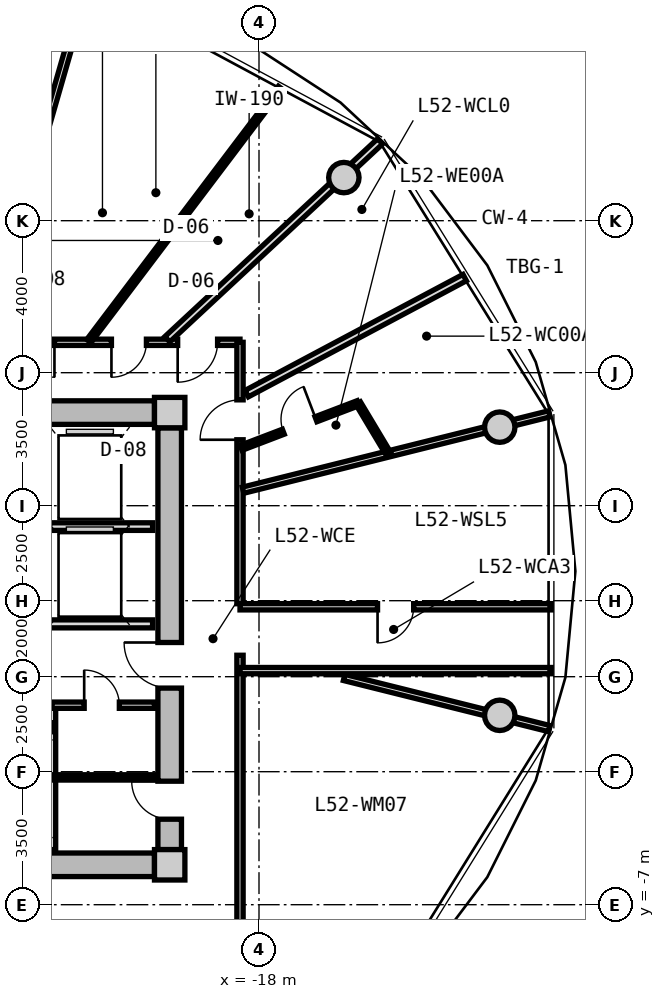
"""IFC4 building model, lengths in metres.
Left out: names, types, materials, properties, quantities, classifications, styles, units other than length and angle.
Written with IfcOpenShell. Run it as: python <this file> out.ifc"""

import sys

from ifc_helpers import new_model, si_unit, direction, frame, frame_2d, origin, origin_2d, place, context, subcontext, project, spatial, rectangle, circle, extrude, source, transform, mapped, element, fill, save


model = new_model("IFC4")
c1 = context("Model", 3, precision=1e-05, world=origin(), true_north=direction((0.0, 1.0)))
c2 = subcontext(c1, "Body", "Model", "MODEL_VIEW")
j1 = project(units=[si_unit("LENGTHUNIT", "METRE"), si_unit("PLANEANGLEUNIT", "RADIAN")], contexts=[c1])
p1 = place(None, origin())
s1 = spatial("IfcSite", under=j1, at=p1, CompositionType="ELEMENT")
p2 = place(p1, origin())
s2 = spatial("IfcBuilding", under=s1, at=p2, CompositionType="ELEMENT")
p3 = place(p2, frame((0.0, 0.0, 167.85)))
s3 = spatial("IfcBuildingStorey", under=s2, at=p3, CompositionType="ELEMENT", Elevation=167.85)
m1 = source(origin(), c2, "Body", "SweptSolid", [
    extrude(rectangle(XDim=0.8, YDim=0.8, at=origin_2d()), origin(), (0.0, 0.0, 1.0), 3.05),
])
for number, where, z_axis, x_axis in (
    (1, (-20.35, -5.95, 0.0), (0.0, 0.0, 1.0), (1.0, 0.0, 0.0)),
    (2, (-20.35, 5.95, 0.0), (0.0, 0.0, 1.0), (1.0, 0.0, 0.0)),
):
    element("IfcColumn", number, at=place(p3, frame(where, z_axis=z_axis, x_axis=x_axis)), inside=s3, PredefinedType="COLUMN", context=c2, shape_type="MappedRepresentation", body=[
        mapped(m1, transform((0.0, 0.0, 0.0), x_axis=(1.0, 0.0, 0.0), y_axis=(0.0, 1.0, 0.0), z_axis=(0.0, 0.0, 1.0), scale=1.0)),
    ])
m2 = source(origin(), c2, "Body", "SweptSolid", [
    extrude(rectangle(XDim=14.5, YDim=0.62, at=frame_2d((7.25, 0.0))), origin(), (0.0, 0.0, 1.0), 2.81),
])
for number, where, z_axis, x_axis in (
    (3, (-35.25, 5.95, 0.0), (0.0, 0.0, 1.0), (1.0, 0.0, 0.0)),
    (4, (-20.75, -5.95, 0.0), (0.0, 0.0, 1.0), (-1.0, 0.0, 0.0)),
):
    element("IfcWall", number, at=place(p3, frame(where, z_axis=z_axis, x_axis=x_axis)), inside=s3, PredefinedType="SHEAR", context=c2, shape_type="MappedRepresentation", body=[
        mapped(m2, transform((0.0, 0.0, 0.0), x_axis=(1.0, 0.0, 0.0), y_axis=(0.0, 1.0, 0.0), z_axis=(0.0, 0.0, 1.0), scale=1.0)),
    ])
m3 = source(origin(), c2, "Body", "SweptSolid", [
    extrude(rectangle(XDim=11.1, YDim=0.62, at=frame_2d((5.55, 0.0))), origin(), (0.0, 0.0, 1.0), 2.81),
])
p4 = place(p3, frame((-20.35, 5.55, 0.0), z_axis=(0.0, 0.0, 1.0), x_axis=(0.0, -1.0, 0.0)))
e5 = element("IfcWall", 5, at=p4, inside=s3, PredefinedType="SHEAR", context=c2, shape_type="MappedRepresentation", body=[
    mapped(m3, transform((0.0, 0.0, 0.0), x_axis=(1.0, 0.0, 0.0), y_axis=(0.0, 1.0, 0.0), z_axis=(0.0, 0.0, 1.0), scale=1.0)),
])
p5 = place(p4, frame((5.65, 0.0, 0.0)))
e6 = element("IfcOpeningElement", 6, at=p5, cuts=e5, PredefinedType="OPENING", context=c2, shape_type="SweptSolid", body=[
    extrude(rectangle(XDim=1.2, YDim=2.15, at=frame_2d((0.6, 1.075))), frame((0.0, 0.32, 0.0), z_axis=(0.0, -1.0, 0.0), x_axis=(1.0, 0.0, 0.0)), (0.0, 0.0, 1.0), 0.64),
])
p6 = place(p4, frame((9.3, 0.0, 0.0)))
e7 = element("IfcOpeningElement", 7, at=p6, cuts=e5, PredefinedType="OPENING", context=c2, shape_type="SweptSolid", body=[
    extrude(rectangle(XDim=1.0, YDim=2.1, at=frame_2d((0.5, 1.05))), frame((0.0, 0.32, 0.0), z_axis=(0.0, -1.0, 0.0), x_axis=(1.0, 0.0, 0.0)), (0.0, 0.0, 1.0), 0.64),
])
m4 = source(origin(), c2, "Body", "SweptSolid", [
    extrude(circle(Radius=0.4, at=origin_2d()), origin(), (0.0, 0.0, 1.0), 3.05),
])
for number, where, z_axis, x_axis in (
    (8, (-11.665, 5.567, 0.0), (0.0, 0.0, 1.0), (1.0, 0.0, 0.0)),
    (9, (-15.767, 12.135, 0.0), (0.0, 0.0, 1.0), (1.0, 0.0, 0.0)),
    (10, (-11.665, -2.016, 0.0), (0.0, 0.0, 1.0), (1.0, 0.0, 0.0)),
):
    element("IfcColumn", number, at=place(p3, frame(where, z_axis=z_axis, x_axis=x_axis)), inside=s3, PredefinedType="COLUMN", context=c2, shape_type="MappedRepresentation", body=[
        mapped(m4, transform((0.0, 0.0, 0.0), x_axis=(1.0, 0.0, 0.0), y_axis=(0.0, 1.0, 0.0), z_axis=(0.0, 0.0, 1.0), scale=1.0)),
    ])
m5 = source(origin(), c2, "Body", "SweptSolid", [
    extrude(rectangle(XDim=3.2, YDim=0.2, at=frame_2d((1.6, 0.0))), origin(), (0.0, 0.0, 1.0), 2.795),
])
p7 = place(p3, frame((-24.0, 2.95, 0.0), z_axis=(0.0, 0.0, 1.0), x_axis=(1.0, 0.0, 0.0)))
e11 = element("IfcWall", 11, at=p7, inside=s3, PredefinedType="PARTITIONING", context=c2, shape_type="MappedRepresentation", body=[
    mapped(m5, transform((0.0, 0.0, 0.0), x_axis=(1.0, 0.0, 0.0), y_axis=(0.0, 1.0, 0.0), z_axis=(0.0, 0.0, 1.0), scale=1.0)),
])
m6 = source(origin(), c2, "Body", "SweptSolid", [
    extrude(rectangle(XDim=6.66, YDim=0.21, at=frame_2d((3.33, 0.0))), origin(), (0.0, 0.0, 1.0), 2.795),
])
p8 = place(p3, frame((-27.46, 0.39, 0.0), z_axis=(0.0, 0.0, 1.0), x_axis=(1.0, 0.0, 0.0)))
e12 = element("IfcWall", 12, at=p8, inside=s3, PredefinedType="PARTITIONING", context=c2, shape_type="MappedRepresentation", body=[
    mapped(m6, transform((0.0, 0.0, 0.0), x_axis=(1.0, 0.0, 0.0), y_axis=(0.0, 1.0, 0.0), z_axis=(0.0, 0.0, 1.0), scale=1.0)),
])
p9 = place(p8, frame((1.0, 0.0, 0.0)))
e13 = element("IfcOpeningElement", 13, at=p9, cuts=e12, PredefinedType="OPENING", context=c2, shape_type="SweptSolid", body=[
    extrude(rectangle(XDim=1.2, YDim=2.15, at=frame_2d((0.6, 1.075))), frame((0.0, 0.115, 0.0), z_axis=(0.0, -1.0, 0.0), x_axis=(1.0, 0.0, 0.0)), (0.0, 0.0, 1.0), 0.23),
])
m7 = source(origin(), c2, "Body", "SweptSolid", [
    extrude(rectangle(XDim=3.8, YDim=0.2, at=frame_2d((1.9, 0.0))), origin(), (0.0, 0.0, 1.0), 2.795),
])
p10 = place(p3, frame((-23.45, -5.55, 0.0), z_axis=(0.0, 0.0, 1.0), x_axis=(0.0, 1.0, 0.0)))
e14 = element("IfcWall", 14, at=p10, inside=s3, PredefinedType="PARTITIONING", context=c2, shape_type="MappedRepresentation", body=[
    mapped(m7, transform((0.0, 0.0, 0.0), x_axis=(1.0, 0.0, 0.0), y_axis=(0.0, 1.0, 0.0), z_axis=(0.0, 0.0, 1.0), scale=1.0)),
])
m8 = source(origin(), c2, "Body", "SweptSolid", [
    extrude(rectangle(XDim=2.7, YDim=0.165, at=frame_2d((1.35, 0.0))), origin(), (0.0, 0.0, 1.0), 2.795),
])
p11 = place(p3, frame((-23.45, -1.75, 0.0), z_axis=(0.0, 0.0, 1.0), x_axis=(1.0, 0.0, 0.0)))
e15 = element("IfcWall", 15, at=p11, inside=s3, PredefinedType="PARTITIONING", context=c2, shape_type="MappedRepresentation", body=[
    mapped(m8, transform((0.0, 0.0, 0.0), x_axis=(1.0, 0.0, 0.0), y_axis=(0.0, 1.0, 0.0), z_axis=(0.0, 0.0, 1.0), scale=1.0)),
])
p12 = place(p11, frame((0.85, 0.0, 0.0)))
e16 = element("IfcOpeningElement", 16, at=p12, cuts=e15, PredefinedType="OPENING", context=c2, shape_type="SweptSolid", body=[
    extrude(rectangle(XDim=0.925, YDim=2.1, at=frame_2d((0.462, 1.05))), frame((0.0, 0.093, 0.0), z_axis=(0.0, -1.0, 0.0), x_axis=(1.0, 0.0, 0.0)), (0.0, 0.0, 1.0), 0.185),
])
m9 = source(origin(), c2, "Body", "SweptSolid", [
    extrude(rectangle(XDim=2.7, YDim=0.14, at=frame_2d((1.35, 0.0))), origin(), (0.0, 0.0, 1.0), 2.795),
])
p13 = place(p3, frame((-23.45, -3.65, 0.0), z_axis=(0.0, 0.0, 1.0), x_axis=(1.0, 0.0, 0.0)))
e17 = element("IfcWall", 17, at=p13, inside=s3, PredefinedType="PARTITIONING", context=c2, shape_type="MappedRepresentation", body=[
    mapped(m9, transform((0.0, 0.0, 0.0), x_axis=(1.0, 0.0, 0.0), y_axis=(0.0, 1.0, 0.0), z_axis=(0.0, 0.0, 1.0), scale=1.0)),
])
m10 = source(origin(), c2, "Body", "SweptSolid", [
    extrude(rectangle(XDim=8.58, YDim=0.165, at=frame_2d((4.29, 0.0))), origin(), (0.0, 0.0, 1.0), 2.795),
])
p14 = place(p3, frame((-27.08, 7.8, 0.0), z_axis=(0.0, 0.0, 1.0), x_axis=(1.0, 0.0, 0.0)))
e18 = element("IfcWall", 18, at=p14, inside=s3, PredefinedType="PARTITIONING", context=c2, shape_type="MappedRepresentation", body=[
    mapped(m10, transform((0.0, 0.0, 0.0), x_axis=(1.0, 0.0, 0.0), y_axis=(0.0, 1.0, 0.0), z_axis=(0.0, 0.0, 1.0), scale=1.0)),
])
p15 = place(p14, frame((6.94, 0.0, 0.0)))
e19 = element("IfcOpeningElement", 19, at=p15, cuts=e18, PredefinedType="OPENING", context=c2, shape_type="SweptSolid", body=[
    extrude(rectangle(XDim=1.05, YDim=2.15, at=frame_2d((0.525, 1.075))), frame((0.0, 0.093, 0.0), z_axis=(0.0, -1.0, 0.0), x_axis=(1.0, 0.0, 0.0)), (0.0, 0.0, 1.0), 0.185),
])
p16 = place(p14, frame((5.197, 0.0, 0.0)))
e20 = element("IfcOpeningElement", 20, at=p16, cuts=e18, PredefinedType="OPENING", context=c2, shape_type="SweptSolid", body=[
    extrude(rectangle(XDim=0.92, YDim=2.1, at=frame_2d((0.46, 1.05))), frame((0.0, 0.093, 0.0), z_axis=(0.0, -1.0, 0.0), x_axis=(1.0, 0.0, 0.0)), (0.0, 0.0, 1.0), 0.185),
])
p17 = place(p14, frame((2.778, 0.0, 0.0)))
e21 = element("IfcOpeningElement", 21, at=p17, cuts=e18, PredefinedType="OPENING", context=c2, shape_type="SweptSolid", body=[
    extrude(rectangle(XDim=0.92, YDim=2.1, at=frame_2d((0.46, 1.05))), frame((0.0, 0.093, 0.0), z_axis=(0.0, -1.0, 0.0), x_axis=(1.0, 0.0, 0.0)), (0.0, 0.0, 1.0), 0.185),
])
m11 = source(origin(), c2, "Body", "SweptSolid", [
    extrude(rectangle(XDim=6.88, YDim=0.165, at=frame_2d((3.44, 0.0))), origin(), (0.0, 0.0, 1.0), 2.795),
])
p18 = place(p3, frame((-18.5, 7.8, 0.0), z_axis=(0.0, 0.0, 1.0), x_axis=(0.0, -1.0, 0.0)))
e22 = element("IfcWall", 22, at=p18, inside=s3, PredefinedType="PARTITIONING", context=c2, shape_type="MappedRepresentation", body=[
    mapped(m11, transform((0.0, 0.0, 0.0), x_axis=(1.0, 0.0, 0.0), y_axis=(0.0, 1.0, 0.0), z_axis=(0.0, 0.0, 1.0), scale=1.0)),
])
p19 = place(p18, frame((1.515, 0.0, 0.0)))
e23 = element("IfcOpeningElement", 23, at=p19, cuts=e22, PredefinedType="OPENING", context=c2, shape_type="SweptSolid", body=[
    extrude(rectangle(XDim=1.05, YDim=2.15, at=frame_2d((0.525, 1.075))), frame((0.0, 0.093, 0.0), z_axis=(0.0, -1.0, 0.0), x_axis=(1.0, 0.0, 0.0)), (0.0, 0.0, 1.0), 0.185),
])
m12 = source(origin(), c2, "Body", "SweptSolid", [
    extrude(rectangle(XDim=7.365, YDim=0.165, at=frame_2d((3.682, 0.0))), origin(), (0.0, 0.0, 1.0), 2.795),
])
p20 = place(p3, frame((-18.5, -0.436, 0.0), z_axis=(0.0, 0.0, 1.0), x_axis=(0.0, -1.0, 0.0)))
e24 = element("IfcWall", 24, at=p20, inside=s3, PredefinedType="PARTITIONING", context=c2, shape_type="MappedRepresentation", body=[
    mapped(m12, transform((0.0, 0.0, 0.0), x_axis=(1.0, 0.0, 0.0), y_axis=(0.0, 1.0, 0.0), z_axis=(0.0, 0.0, 1.0), scale=1.0)),
])
m13 = source(origin(), c2, "Body", "SweptSolid", [
    extrude(rectangle(XDim=9.73, YDim=0.165, at=frame_2d((4.865, 0.0))), origin(), (0.0, 0.0, 1.0), 2.345),
])
p21 = place(p3, frame((-25.217, 7.88, 0.0), z_axis=(0.0, 0.0, 1.0), x_axis=(0.27679492614, 0.960929013436, 0.0)))
e25 = element("IfcWall", 25, at=p21, inside=s3, PredefinedType="PARTITIONING", context=c2, shape_type="MappedRepresentation", body=[
    mapped(m13, transform((0.0, 0.0, 0.0), x_axis=(1.0, 0.0, 0.0), y_axis=(0.0, 1.0, 0.0), z_axis=(0.0, 0.0, 1.0), scale=1.0)),
])
m14 = source(origin(), c2, "Body", "SweptSolid", [
    extrude(rectangle(XDim=5.564, YDim=0.165, at=frame_2d((2.782, 0.0))), origin(), (0.0, 0.0, 1.0), 2.345),
])
p22 = place(p3, frame((-15.76, -1.02, 0.0), z_axis=(0.0, 0.0, 1.0), x_axis=(0.970315176167, -0.241843872984, 0.0)))
e26 = element("IfcWall", 26, at=p22, inside=s3, PredefinedType="PARTITIONING", context=c2, shape_type="MappedRepresentation", body=[
    mapped(m14, transform((0.0, 0.0, 0.0), x_axis=(1.0, 0.0, 0.0), y_axis=(0.0, 1.0, 0.0), z_axis=(0.0, 0.0, 1.0), scale=1.0)),
])
m15 = source(origin(), c2, "Body", "SweptSolid", [
    extrude(rectangle(XDim=8.305, YDim=0.165, at=frame_2d((4.153, 0.0))), origin(), (0.0, 0.0, 1.0), 2.345),
])
p23 = place(p3, frame((-18.42, 3.908, 0.0), z_axis=(0.0, 0.0, 1.0), x_axis=(0.970309994378, 0.241864662175, 0.0)))
e27 = element("IfcWall", 27, at=p23, inside=s3, PredefinedType="PARTITIONING", context=c2, shape_type="MappedRepresentation", body=[
    mapped(m15, transform((0.0, 0.0, 0.0), x_axis=(1.0, 0.0, 0.0), y_axis=(0.0, 1.0, 0.0), z_axis=(0.0, 0.0, 1.0), scale=1.0)),
])
m16 = source(origin(), c2, "Body", "SweptSolid", [
    extrude(rectangle(XDim=8.189, YDim=0.165, at=frame_2d((4.094, 0.0))), origin(), (0.0, 0.0, 1.0), 2.795),
])
p24 = place(p3, frame((-18.5, 0.84, 0.0), z_axis=(0.0, 0.0, 1.0), x_axis=(1.0, 0.0, 0.0)))
e28 = element("IfcWall", 28, at=p24, inside=s3, PredefinedType="PARTITIONING", context=c2, shape_type="MappedRepresentation", body=[
    mapped(m16, transform((0.0, 0.0, 0.0), x_axis=(1.0, 0.0, 0.0), y_axis=(0.0, 1.0, 0.0), z_axis=(0.0, 0.0, 1.0), scale=1.0)),
])
p25 = place(p24, frame((3.619, 0.0, 0.0)))
e29 = element("IfcOpeningElement", 29, at=p25, cuts=e28, PredefinedType="OPENING", context=c2, shape_type="SweptSolid", body=[
    extrude(rectangle(XDim=0.95, YDim=2.1, at=frame_2d((0.475, 1.05))), frame((0.0, 0.093, 0.0), z_axis=(0.0, -1.0, 0.0), x_axis=(1.0, 0.0, 0.0)), (0.0, 0.0, 1.0), 0.185),
])
p26 = place(p3, frame((-10.311, -0.84, 0.0), z_axis=(0.0, 0.0, 1.0), x_axis=(-1.0, 0.0, 0.0)))
e30 = element("IfcWall", 30, at=p26, inside=s3, PredefinedType="PARTITIONING", context=c2, shape_type="MappedRepresentation", body=[
    mapped(m16, transform((0.0, 0.0, 0.0), x_axis=(1.0, 0.0, 0.0), y_axis=(0.0, 1.0, 0.0), z_axis=(0.0, 0.0, 1.0), scale=1.0)),
])
m17 = source(origin(), c2, "Body", "SweptSolid", [
    extrude(rectangle(XDim=7.648, YDim=0.19, at=frame_2d((3.824, 0.0))), origin(), (0.0, 0.0, 1.0), 2.345),
])
p27 = place(p3, frame((-20.413, 7.88, 0.0), z_axis=(0.0, 0.0, 1.0), x_axis=(0.732182665826, 0.681108320213, 0.0)))
e31 = element("IfcWall", 31, at=p27, inside=s3, PredefinedType="PARTITIONING", context=c2, shape_type="MappedRepresentation", body=[
    mapped(m17, transform((0.0, 0.0, 0.0), x_axis=(1.0, 0.0, 0.0), y_axis=(0.0, 1.0, 0.0), z_axis=(0.0, 0.0, 1.0), scale=1.0)),
])
m18 = source(origin(), c2, "Body", "SweptSolid", [
    extrude(rectangle(XDim=6.499, YDim=0.19, at=frame_2d((3.25, 0.0))), origin(), (0.0, 0.0, 1.0), 2.795),
])
p28 = place(p3, frame((-18.324, 6.449, 0.0), z_axis=(0.0, 0.0, 1.0), x_axis=(0.882715595921, 0.469907625729, 0.0)))
e32 = element("IfcWall", 32, at=p28, inside=s3, PredefinedType="PARTITIONING", context=c2, shape_type="MappedRepresentation", body=[
    mapped(m18, transform((0.0, 0.0, 0.0), x_axis=(1.0, 0.0, 0.0), y_axis=(0.0, 1.0, 0.0), z_axis=(0.0, 0.0, 1.0), scale=1.0)),
])
m19 = source(origin(), c2, "Body", "SweptSolid", [
    extrude(rectangle(XDim=3.295, YDim=0.14, at=frame_2d((1.647, 0.0))), origin(), (0.0, 0.0, 1.0), 2.795),
])
p29 = place(p3, frame((-18.47, 5.023, 0.0), z_axis=(0.0, 0.0, 1.0), x_axis=(0.934202224769, 0.356743890258, 0.0)))
e33 = element("IfcWall", 33, at=p29, inside=s3, PredefinedType="PARTITIONING", context=c2, shape_type="MappedRepresentation", body=[
    mapped(m19, transform((0.0, 0.0, 0.0), x_axis=(1.0, 0.0, 0.0), y_axis=(0.0, 1.0, 0.0), z_axis=(0.0, 0.0, 1.0), scale=1.0)),
])
p30 = place(p29, frame((1.188, 0.0, 0.0)))
e34 = element("IfcOpeningElement", 34, at=p30, cuts=e33, PredefinedType="OPENING", context=c2, shape_type="SweptSolid", body=[
    extrude(rectangle(XDim=0.92, YDim=2.1, at=frame_2d((0.46, 1.05))), frame((0.0, 0.08, 0.0), z_axis=(0.0, -1.0, 0.0), x_axis=(1.0, 0.0, 0.0)), (0.0, 0.0, 1.0), 0.16),
])
m20 = source(origin(), c2, "Body", "SweptSolid", [
    extrude(rectangle(XDim=1.558, YDim=0.14, at=frame_2d((0.779, 0.0))), origin(), (0.0, 0.0, 1.0), 2.795),
])
p31 = place(p3, frame((-15.392, 6.198, 0.0), z_axis=(0.0, 0.0, 1.0), x_axis=(0.513735221728, -0.85794878749, 0.0)))
e35 = element("IfcWall", 35, at=p31, inside=s3, PredefinedType="PARTITIONING", context=c2, shape_type="MappedRepresentation", body=[
    mapped(m20, transform((0.0, 0.0, 0.0), x_axis=(1.0, 0.0, 0.0), y_axis=(0.0, 1.0, 0.0), z_axis=(0.0, 0.0, 1.0), scale=1.0)),
])
m21 = source(origin(), c2, "Body", "SweptSolid", [
    extrude(rectangle(XDim=8.359, YDim=0.14, at=frame_2d((4.18, 0.0))), origin(), (0.0, 0.0, 1.0), 2.795),
])
p32 = place(p3, frame((-22.477, 7.83, 0.0), z_axis=(0.0, 0.0, 1.0), x_axis=(0.603265985309, 0.797540062297, 0.0)))
e36 = element("IfcWall", 36, at=p32, inside=s3, PredefinedType="PARTITIONING", context=c2, shape_type="MappedRepresentation", body=[
    mapped(m21, transform((0.0, 0.0, 0.0), x_axis=(1.0, 0.0, 0.0), y_axis=(0.0, 1.0, 0.0), z_axis=(0.0, 0.0, 1.0), scale=1.0)),
])
m22 = source(origin(), c2, "Body", "SweptSolid", [
    extrude(rectangle(XDim=1.2, YDim=2.15, at=frame_2d((0.6, 1.075))), frame((0.0, 0.025, 0.0), z_axis=(0.0, -1.0, 0.0), x_axis=(1.0, 0.0, 0.0)), (0.0, 0.0, 1.0), 0.05),
])
p33 = place(p5, frame((1.2, 0.0, 0.0), z_axis=(0.0, 0.0, 1.0), x_axis=(-1.0, 0.0, 0.0)))
e37 = element("IfcDoor", 37, at=p33, inside=s3, OperationType="SINGLE_SWING_RIGHT", PredefinedType="DOOR", context=c2, shape_type="MappedRepresentation", body=[
    mapped(m22, transform((0.0, 0.0, 0.0), x_axis=(1.0, 0.0, 0.0), y_axis=(0.0, 1.0, 0.0), z_axis=(0.0, 0.0, 1.0), scale=1.0)),
])
fill(e6, e37)
m23 = source(origin(), c2, "Body", "SweptSolid", [
    extrude(rectangle(XDim=0.925, YDim=2.1, at=frame_2d((0.462, 1.05))), frame((0.0, 0.025, 0.0), z_axis=(0.0, -1.0, 0.0), x_axis=(1.0, 0.0, 0.0)), (0.0, 0.0, 1.0), 0.05),
])
p34 = place(p12, origin())
e38 = element("IfcDoor", 38, at=p34, inside=s3, OperationType="SINGLE_SWING_LEFT", PredefinedType="DOOR", context=c2, shape_type="MappedRepresentation", body=[
    mapped(m23, transform((0.0, 0.0, 0.0), x_axis=(1.0, 0.0, 0.0), y_axis=(0.0, 1.0, 0.0), z_axis=(0.0, 0.0, 1.0), scale=1.0)),
])
fill(e16, e38)
m24 = source(origin(), c2, "Body", "SweptSolid", [
    extrude(rectangle(XDim=1.0, YDim=2.1, at=frame_2d((0.5, 1.05))), frame((0.0, 0.025, 0.0), z_axis=(0.0, -1.0, 0.0), x_axis=(1.0, 0.0, 0.0)), (0.0, 0.0, 1.0), 0.05),
])
p35 = place(p6, frame((1.0, 0.0, 0.0), z_axis=(0.0, 0.0, 1.0), x_axis=(-1.0, 0.0, 0.0)))
e39 = element("IfcDoor", 39, at=p35, inside=s3, OperationType="SINGLE_SWING_RIGHT", PredefinedType="DOOR", context=c2, shape_type="MappedRepresentation", body=[
    mapped(m24, transform((0.0, 0.0, 0.0), x_axis=(1.0, 0.0, 0.0), y_axis=(0.0, 1.0, 0.0), z_axis=(0.0, 0.0, 1.0), scale=1.0)),
])
fill(e7, e39)
m25 = source(origin(), c2, "Body", "SweptSolid", [
    extrude(rectangle(XDim=0.95, YDim=2.1, at=frame_2d((0.475, 1.05))), frame((0.0, 0.025, 0.0), z_axis=(0.0, -1.0, 0.0), x_axis=(1.0, 0.0, 0.0)), (0.0, 0.0, 1.0), 0.05),
])
p36 = place(p25, frame((0.95, 0.0, 0.0), z_axis=(0.0, 0.0, 1.0), x_axis=(-1.0, 0.0, 0.0)))
e40 = element("IfcDoor", 40, at=p36, inside=s3, OperationType="SINGLE_SWING_RIGHT", PredefinedType="DOOR", context=c2, shape_type="MappedRepresentation", body=[
    mapped(m25, transform((0.0, 0.0, 0.0), x_axis=(1.0, 0.0, 0.0), y_axis=(0.0, 1.0, 0.0), z_axis=(0.0, 0.0, 1.0), scale=1.0)),
])
fill(e29, e40)
m26 = source(origin(), c2, "Body", "SweptSolid", [
    extrude(rectangle(XDim=1.05, YDim=2.15, at=frame_2d((0.525, 1.075))), frame((0.0, 0.025, 0.0), z_axis=(0.0, -1.0, 0.0), x_axis=(1.0, 0.0, 0.0)), (0.0, 0.0, 1.0), 0.05),
])
p37 = place(p19, frame((1.05, 0.0, 0.0), z_axis=(0.0, 0.0, 1.0), x_axis=(-1.0, 0.0, 0.0)))
e41 = element("IfcDoor", 41, at=p37, inside=s3, OperationType="SINGLE_SWING_LEFT", PredefinedType="DOOR", context=c2, shape_type="MappedRepresentation", body=[
    mapped(m26, transform((0.0, 0.0, 0.0), x_axis=(1.0, 0.0, 0.0), y_axis=(0.0, 1.0, 0.0), z_axis=(0.0, 0.0, 1.0), scale=1.0)),
])
fill(e23, e41)
m27 = source(origin(), c2, "Body", "SweptSolid", [
    extrude(rectangle(XDim=0.92, YDim=2.1, at=frame_2d((0.46, 1.05))), frame((0.0, 0.025, 0.0), z_axis=(0.0, -1.0, 0.0), x_axis=(1.0, 0.0, 0.0)), (0.0, 0.0, 1.0), 0.05),
])
p38 = place(p30, origin())
e42 = element("IfcDoor", 42, at=p38, inside=s3, OperationType="SINGLE_SWING_RIGHT", PredefinedType="DOOR", context=c2, shape_type="MappedRepresentation", body=[
    mapped(m27, transform((0.0, 0.0, 0.0), x_axis=(1.0, 0.0, 0.0), y_axis=(0.0, 1.0, 0.0), z_axis=(0.0, 0.0, 1.0), scale=1.0)),
])
fill(e34, e42)
p39 = place(p15, frame((1.05, 0.0, 0.0), z_axis=(0.0, 0.0, 1.0), x_axis=(-1.0, 0.0, 0.0)))
e43 = element("IfcDoor", 43, at=p39, inside=s3, OperationType="SINGLE_SWING_RIGHT", PredefinedType="DOOR", context=c2, shape_type="MappedRepresentation", body=[
    mapped(m26, transform((0.0, 0.0, 0.0), x_axis=(1.0, 0.0, 0.0), y_axis=(0.0, 1.0, 0.0), z_axis=(0.0, 0.0, 1.0), scale=1.0)),
])
fill(e19, e43)
p40 = place(p16, frame((0.92, 0.0, 0.0), z_axis=(0.0, 0.0, 1.0), x_axis=(-1.0, 0.0, 0.0)))
e44 = element("IfcDoor", 44, at=p40, inside=s3, OperationType="SINGLE_SWING_RIGHT", PredefinedType="DOOR", context=c2, shape_type="MappedRepresentation", body=[
    mapped(m27, transform((0.0, 0.0, 0.0), x_axis=(1.0, 0.0, 0.0), y_axis=(0.0, 1.0, 0.0), z_axis=(0.0, 0.0, 1.0), scale=1.0)),
])
fill(e20, e44)
p41 = place(p17, frame((0.92, 0.0, 0.0), z_axis=(0.0, 0.0, 1.0), x_axis=(-1.0, 0.0, 0.0)))
e45 = element("IfcDoor", 45, at=p41, inside=s3, OperationType="SINGLE_SWING_LEFT", PredefinedType="DOOR", context=c2, shape_type="MappedRepresentation", body=[
    mapped(m27, transform((0.0, 0.0, 0.0), x_axis=(1.0, 0.0, 0.0), y_axis=(0.0, 1.0, 0.0), z_axis=(0.0, 0.0, 1.0), scale=1.0)),
])
fill(e21, e45)
save(model, sys.argv[1])
